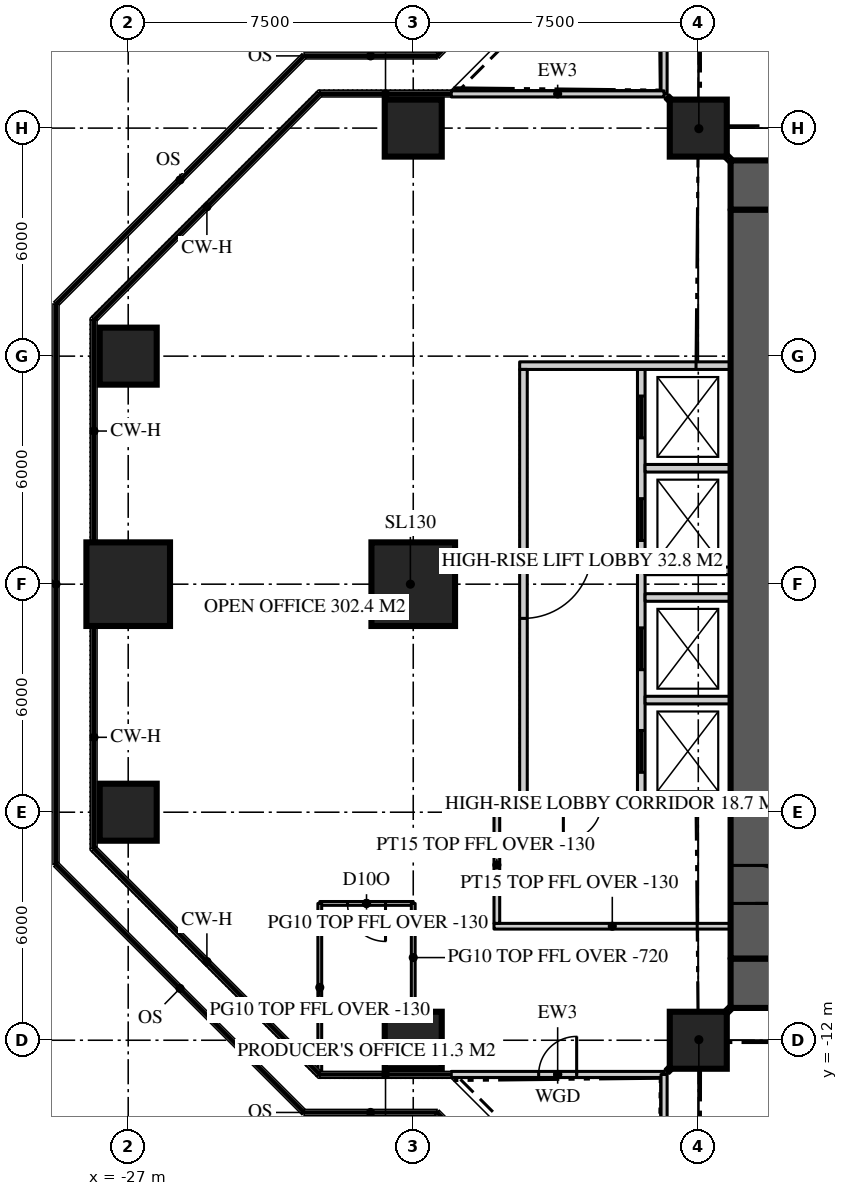
"""IFC4 building model, lengths in metres.
Left out: names, types, materials, properties, quantities, classifications, styles, units other than length and angle.
Written with IfcOpenShell. Run it as: python <this file> out.ifc"""

import sys

from ifc_helpers import new_model, si_unit, direction, frame, frame_2d, origin, origin_2d, place, context, subcontext, project, spatial, rectangle, extrude, element, fill, save


model = new_model("IFC4")
c1 = context("Model", 3, precision=1e-05, world=origin(), true_north=direction((0.0, 1.0)))
c2 = subcontext(c1, "Body", "Model", "MODEL_VIEW")
j1 = project(units=[si_unit("LENGTHUNIT", "METRE"), si_unit("PLANEANGLEUNIT", "RADIAN")], contexts=[c1])
p1 = place(None, origin())
s1 = spatial("IfcSite", under=j1, at=p1, CompositionType="ELEMENT")
p2 = place(p1, origin())
s2 = spatial("IfcBuilding", under=s1, at=p2, CompositionType="ELEMENT")
p3 = place(p2, frame((0.0, 0.0, 232.2)))
s3 = spatial("IfcBuildingStorey", under=s2, at=p3, CompositionType="ELEMENT", Elevation=232.2)
p4 = place(p3, frame((-11.15, 10.5, 0.0), z_axis=(0.0, 0.0, 1.0), x_axis=(1.0, 0.0, 0.0)))
e1 = element("IfcWall", 1, at=p4, inside=s3, PredefinedType="SHEAR", context=c2, shape_type="SweptSolid", body=[
    extrude(rectangle(XDim=22.3, YDim=1.3, at=frame_2d((11.15, 0.0))), origin(), (0.0, 0.0, 1.0), 3.9),
])
p5 = place(p4, frame((4.25, 0.0, 0.0)))
e2 = element("IfcOpeningElement", 2, at=p5, cuts=e1, PredefinedType="OPENING", context=c2, shape_type="SweptSolid", body=[
    extrude(rectangle(XDim=1.8, YDim=2.2, at=frame_2d((0.9, 1.1))), frame((0.0, 0.66, 0.0), z_axis=(0.0, -1.0, 0.0), x_axis=(1.0, 0.0, 0.0)), (0.0, 0.0, 1.0), 1.32),
])
p6 = place(p4, frame((16.25, 0.0, 0.0)))
e3 = element("IfcOpeningElement", 3, at=p6, cuts=e1, PredefinedType="OPENING", context=c2, shape_type="SweptSolid", body=[
    extrude(rectangle(XDim=1.8, YDim=2.2, at=frame_2d((0.9, 1.1))), frame((0.0, 0.66, 0.0), z_axis=(0.0, -1.0, 0.0), x_axis=(1.0, 0.0, 0.0)), (0.0, 0.0, 1.0), 1.32),
])
p7 = place(p3, frame((11.15, -10.5, 0.0), z_axis=(0.0, 0.0, 1.0), x_axis=(-1.0, 0.0, 0.0)))
e4 = element("IfcWall", 4, at=p7, inside=s3, PredefinedType="SHEAR", context=c2, shape_type="SweptSolid", body=[
    extrude(rectangle(XDim=22.3, YDim=1.3, at=frame_2d((11.15, 0.0))), origin(), (0.0, 0.0, 1.0), 3.9),
])
p8 = place(p7, frame((16.25, 0.0, 0.0)))
e5 = element("IfcOpeningElement", 5, at=p8, cuts=e4, PredefinedType="OPENING", context=c2, shape_type="SweptSolid", body=[
    extrude(rectangle(XDim=1.8, YDim=2.2, at=frame_2d((0.9, 1.1))), frame((0.0, 0.66, 0.0), z_axis=(0.0, -1.0, 0.0), x_axis=(1.0, 0.0, 0.0)), (0.0, 0.0, 1.0), 1.32),
])
p9 = place(p7, frame((4.25, 0.0, 0.0)))
e6 = element("IfcOpeningElement", 6, at=p9, cuts=e4, PredefinedType="OPENING", context=c2, shape_type="SweptSolid", body=[
    extrude(rectangle(XDim=1.8, YDim=2.2, at=frame_2d((0.9, 1.1))), frame((0.0, 0.66, 0.0), z_axis=(0.0, -1.0, 0.0), x_axis=(1.0, 0.0, 0.0)), (0.0, 0.0, 1.0), 1.32),
])
p10 = place(p3, frame((-10.5, 9.85, 0.0), z_axis=(0.0, 0.0, 1.0), x_axis=(0.0, -1.0, 0.0)))
e7 = element("IfcWall", 7, at=p10, inside=s3, PredefinedType="SHEAR", context=c2, shape_type="SweptSolid", body=[
    extrude(rectangle(XDim=19.7, YDim=1.3, at=frame_2d((9.85, 0.0))), origin(), (0.0, 0.0, 1.0), 3.9),
])
p11 = place(p10, frame((17.25, 0.0, 0.0)))
e8 = element("IfcOpeningElement", 8, at=p11, cuts=e7, PredefinedType="OPENING", context=c2, shape_type="SweptSolid", body=[
    extrude(rectangle(XDim=1.0, YDim=2.2, at=frame_2d((0.5, 1.1))), frame((0.0, 0.66, 0.0), z_axis=(0.0, -1.0, 0.0), x_axis=(1.0, 0.0, 0.0)), (0.0, 0.0, 1.0), 1.32),
])
for number, where, z_axis, x_axis in (
    (9, (-19.5, -12.0, 0.0), (0.0, 0.0, 1.0), (1.0, 0.0, 0.0)),
    (10, (-12.0, -12.0, 0.0), (0.0, 0.0, 1.0), (1.0, 0.0, 0.0)),
    (11, (-27.0, -6.0, 0.0), (0.0, 0.0, 1.0), (1.0, 0.0, 0.0)),
):
    element("IfcColumn", number, at=place(p3, frame(where, z_axis=z_axis, x_axis=x_axis)), inside=s3, PredefinedType="COLUMN", context=c2, shape_type="SweptSolid", body=[
        extrude(rectangle(XDim=1.5, YDim=1.5, at=origin_2d()), origin(), (0.0, 0.0, 1.0), 3.9),
    ])
for number, where, z_axis, x_axis in (
    (12, (-27.0, 0.0, 0.0), (0.0, 0.0, 1.0), (1.0, 0.0, 0.0)),
    (13, (-19.5, 0.0, 0.0), (0.0, 0.0, 1.0), (1.0, 0.0, 0.0)),
):
    element("IfcColumn", number, at=place(p3, frame(where, z_axis=z_axis, x_axis=x_axis)), inside=s3, PredefinedType="COLUMN", context=c2, shape_type="SweptSolid", body=[
        extrude(rectangle(XDim=2.2, YDim=2.2, at=origin_2d()), origin(), (0.0, 0.0, 1.0), 3.9),
    ])
for number, where, z_axis, x_axis in (
    (14, (-27.0, 6.0, 0.0), (0.0, 0.0, 1.0), (1.0, 0.0, 0.0)),
    (15, (-19.5, 12.0, 0.0), (0.0, 0.0, 1.0), (1.0, 0.0, 0.0)),
    (16, (-12.0, 12.0, 0.0), (0.0, 0.0, 1.0), (1.0, 0.0, 0.0)),
):
    element("IfcColumn", number, at=place(p3, frame(where, z_axis=z_axis, x_axis=x_axis)), inside=s3, PredefinedType="COLUMN", context=c2, shape_type="SweptSolid", body=[
        extrude(rectangle(XDim=1.5, YDim=1.5, at=origin_2d()), origin(), (0.0, 0.0, 1.0), 3.9),
    ])
p12 = place(p3, frame((-12.9, 18.5, 0.0), z_axis=(0.0, 0.0, 1.0), x_axis=(0.0, -1.0, 0.0)))
e17 = element("IfcWall", 17, at=p12, inside=s3, PredefinedType="SOLIDWALL", context=c2, shape_type="SweptSolid", body=[
    extrude(rectangle(XDim=5.6, YDim=0.16, at=frame_2d((2.8, 0.0))), origin(), (0.0, 0.0, 1.0), 3.77),
])
p13 = place(p12, frame((2.3, 0.0, 0.0)))
e18 = element("IfcOpeningElement", 18, at=p13, cuts=e17, PredefinedType="OPENING", context=c2, shape_type="SweptSolid", body=[
    extrude(rectangle(XDim=1.0, YDim=2.2, at=frame_2d((0.5, 1.1))), frame((0.0, 0.09, 0.0), z_axis=(0.0, -1.0, 0.0), x_axis=(1.0, 0.0, 0.0)), (0.0, 0.0, 1.0), 0.18),
])
p14 = place(p3, frame((-12.9, 12.9, 0.0), z_axis=(0.0, 0.0, 1.0), x_axis=(-1.0, 0.0, 0.0)))
e19 = element("IfcWall", 19, at=p14, inside=s3, PredefinedType="SOLIDWALL", context=c2, shape_type="SweptSolid", body=[
    extrude(rectangle(XDim=5.6, YDim=0.16, at=frame_2d((2.8, 0.0))), origin(), (0.0, 0.0, 1.0), 3.77),
])
p15 = place(p3, frame((-18.5, -12.9, 0.0), z_axis=(0.0, 0.0, 1.0), x_axis=(1.0, 0.0, 0.0)))
e20 = element("IfcWall", 20, at=p15, inside=s3, PredefinedType="SOLIDWALL", context=c2, shape_type="SweptSolid", body=[
    extrude(rectangle(XDim=5.6, YDim=0.16, at=frame_2d((2.8, 0.0))), origin(), (0.0, 0.0, 1.0), 3.77),
])
p16 = place(p15, frame((2.3, 0.0, 0.0)))
e21 = element("IfcOpeningElement", 21, at=p16, cuts=e20, PredefinedType="OPENING", context=c2, shape_type="SweptSolid", body=[
    extrude(rectangle(XDim=1.0, YDim=2.2, at=frame_2d((0.5, 1.1))), frame((0.0, 0.09, 0.0), z_axis=(0.0, -1.0, 0.0), x_axis=(1.0, 0.0, 0.0)), (0.0, 0.0, 1.0), 0.18),
])
p17 = place(p3, frame((-12.9, -12.9, 0.0), z_axis=(0.0, 0.0, 1.0), x_axis=(0.0, -1.0, 0.0)))
e22 = element("IfcWall", 22, at=p17, inside=s3, PredefinedType="SOLIDWALL", context=c2, shape_type="SweptSolid", body=[
    extrude(rectangle(XDim=5.6, YDim=0.16, at=frame_2d((2.8, 0.0))), origin(), (0.0, 0.0, 1.0), 3.77),
])
p18 = place(p3, frame((-19.5, -8.4, 0.0), z_axis=(0.0, 0.0, 1.0), x_axis=(-1.0, 0.0, 0.0)))
e23 = element("IfcWall", 23, at=p18, inside=s3, PredefinedType="PARTITIONING", context=c2, shape_type="SweptSolid", body=[
    extrude(rectangle(XDim=2.459, YDim=0.1, at=frame_2d((1.229, 0.0))), origin(), (0.0, 0.0, 1.0), 3.77),
])
p19 = place(p18, frame((0.729, 0.0, 0.0)))
e24 = element("IfcOpeningElement", 24, at=p19, cuts=e23, PredefinedType="OPENING", context=c2, shape_type="SweptSolid", body=[
    extrude(rectangle(XDim=1.0, YDim=2.2, at=frame_2d((0.5, 1.1))), frame((0.0, 0.06, 0.0), z_axis=(0.0, -1.0, 0.0), x_axis=(1.0, 0.0, 0.0)), (0.0, 0.0, 1.0), 0.12),
])
p20 = place(p3, frame((-19.5, -8.4, 0.0), z_axis=(0.0, 0.0, 1.0), x_axis=(0.0, -1.0, 0.0)))
e25 = element("IfcWall", 25, at=p20, inside=s3, PredefinedType="PARTITIONING", context=c2, shape_type="SweptSolid", body=[
    extrude(rectangle(XDim=2.85, YDim=0.1, at=frame_2d((1.425, 0.0))), origin(), (0.0, 0.0, 1.0), 3.18),
])
p21 = place(p3, frame((-21.959, -8.4, 0.0), z_axis=(0.0, 0.0, 1.0), x_axis=(0.0, -1.0, 0.0)))
e26 = element("IfcWall", 26, at=p21, inside=s3, PredefinedType="PARTITIONING", context=c2, shape_type="SweptSolid", body=[
    extrude(rectangle(XDim=4.42, YDim=0.1, at=frame_2d((2.21, 0.0))), origin(), (0.0, 0.0, 1.0), 3.77),
])
p22 = place(p3, frame((-13.5, 5.65, 0.0), z_axis=(0.0, 0.0, 1.0), x_axis=(0.0, -1.0, 0.0)))
e27 = element("IfcWall", 27, at=p22, inside=s3, PredefinedType="SOLIDWALL", context=c2, shape_type="SweptSolid", body=[
    extrude(rectangle(XDim=11.3, YDim=0.2, at=frame_2d((5.65, 0.0))), origin(), (0.0, 0.0, 1.0), 3.7),
])
p23 = place(p22, frame((0.7, 0.0, 0.0)))
e28 = element("IfcOpeningElement", 28, at=p23, cuts=e27, PredefinedType="OPENING", context=c2, shape_type="SweptSolid", body=[
    extrude(rectangle(XDim=1.1, YDim=2.2, at=frame_2d((0.55, 1.1))), frame((0.0, 0.11, 0.0), z_axis=(0.0, -1.0, 0.0), x_axis=(1.0, 0.0, 0.0)), (0.0, 0.0, 1.0), 0.22),
])
p24 = place(p22, frame((3.4, 0.0, 0.0)))
e29 = element("IfcOpeningElement", 29, at=p24, cuts=e27, PredefinedType="OPENING", context=c2, shape_type="SweptSolid", body=[
    extrude(rectangle(XDim=1.1, YDim=2.2, at=frame_2d((0.55, 1.1))), frame((0.0, 0.11, 0.0), z_axis=(0.0, -1.0, 0.0), x_axis=(1.0, 0.0, 0.0)), (0.0, 0.0, 1.0), 0.22),
])
p25 = place(p22, frame((6.8, 0.0, 0.0)))
e30 = element("IfcOpeningElement", 30, at=p25, cuts=e27, PredefinedType="OPENING", context=c2, shape_type="SweptSolid", body=[
    extrude(rectangle(XDim=1.1, YDim=2.2, at=frame_2d((0.55, 1.1))), frame((0.0, 0.11, 0.0), z_axis=(0.0, -1.0, 0.0), x_axis=(1.0, 0.0, 0.0)), (0.0, 0.0, 1.0), 0.22),
])
p26 = place(p22, frame((9.5, 0.0, 0.0)))
e31 = element("IfcOpeningElement", 31, at=p26, cuts=e27, PredefinedType="OPENING", context=c2, shape_type="SweptSolid", body=[
    extrude(rectangle(XDim=1.1, YDim=2.2, at=frame_2d((0.55, 1.1))), frame((0.0, 0.11, 0.0), z_axis=(0.0, -1.0, 0.0), x_axis=(1.0, 0.0, 0.0)), (0.0, 0.0, 1.0), 0.22),
])
p27 = place(p3, frame((-11.15, 5.75, 0.0), z_axis=(0.0, 0.0, 1.0), x_axis=(-1.0, 0.0, 0.0)))
e32 = element("IfcWall", 32, at=p27, inside=s3, PredefinedType="SOLIDWALL", context=c2, shape_type="SweptSolid", body=[
    extrude(rectangle(XDim=5.55, YDim=0.2, at=frame_2d((2.775, 0.0))), origin(), (0.0, 0.0, 1.0), 3.7),
])
p28 = place(p3, frame((-11.15, -5.75, 0.0), z_axis=(0.0, 0.0, 1.0), x_axis=(-1.0, 0.0, 0.0)))
e33 = element("IfcWall", 33, at=p28, inside=s3, PredefinedType="SOLIDWALL", context=c2, shape_type="SweptSolid", body=[
    extrude(rectangle(XDim=5.55, YDim=0.2, at=frame_2d((2.775, 0.0))), origin(), (0.0, 0.0, 1.0), 3.7),
])
p29 = place(p28, frame((3.4, 0.0, 0.0)))
e34 = element("IfcOpeningElement", 34, at=p29, cuts=e33, PredefinedType="OPENING", context=c2, shape_type="SweptSolid", body=[
    extrude(rectangle(XDim=1.0, YDim=2.2, at=frame_2d((0.5, 1.1))), frame((0.0, 0.11, 0.0), z_axis=(0.0, -1.0, 0.0), x_axis=(1.0, 0.0, 0.0)), (0.0, 0.0, 1.0), 0.22),
])
for number, where, z_axis, x_axis in (
    (35, (-11.15, 3.05, 0.0), (0.0, 0.0, 1.0), (-1.0, 0.0, 0.0)),
    (36, (-11.15, 0.35, 0.0), (0.0, 0.0, 1.0), (-1.0, 0.0, 0.0)),
    (37, (-11.15, -0.35, 0.0), (0.0, 0.0, 1.0), (-1.0, 0.0, 0.0)),
    (38, (-11.15, -3.05, 0.0), (0.0, 0.0, 1.0), (-1.0, 0.0, 0.0)),
):
    element("IfcWall", number, at=place(p3, frame(where, z_axis=z_axis, x_axis=x_axis)), inside=s3, PredefinedType="SOLIDWALL", context=c2, shape_type="SweptSolid", body=[
        extrude(rectangle(XDim=2.25, YDim=0.2, at=frame_2d((1.125, 0.0))), origin(), (0.0, 0.0, 1.0), 3.7),
    ])
p30 = place(p3, frame((-16.6, 5.65, 0.0), z_axis=(0.0, 0.0, 1.0), x_axis=(0.0, -1.0, 0.0)))
e39 = element("IfcWall", 39, at=p30, inside=s3, PredefinedType="SOLIDWALL", context=c2, shape_type="SweptSolid", body=[
    extrude(rectangle(XDim=11.3, YDim=0.2, at=frame_2d((5.65, 0.0))), origin(), (0.0, 0.0, 1.0), 3.18),
])
p31 = place(p30, frame((4.75, 0.0, 0.0)))
e40 = element("IfcOpeningElement", 40, at=p31, cuts=e39, PredefinedType="OPENING", context=c2, shape_type="SweptSolid", body=[
    extrude(rectangle(XDim=1.8, YDim=2.2, at=frame_2d((0.9, 1.1))), frame((0.0, 0.11, 0.0), z_axis=(0.0, -1.0, 0.0), x_axis=(1.0, 0.0, 0.0)), (0.0, 0.0, 1.0), 0.22),
])
for number, where, z_axis, x_axis in (
    (41, (-11.15, 11.15, 0.0), (0.0, 0.0, 1.0), (-0.707, 0.707, 0.0)),
    (42, (-11.15, -11.15, 0.0), (0.0, 0.0, 1.0), (-0.707, -0.707, 0.0)),
):
    element("IfcWall", number, at=place(p3, frame(where, z_axis=z_axis, x_axis=x_axis)), inside=s3, PredefinedType="PARTITIONING", context=c2, shape_type="SweptSolid", body=[
        extrude(rectangle(XDim=2.362, YDim=0.15, at=frame_2d((1.181, 0.0))), origin(), (0.0, 0.0, 1.0), 3.22),
    ])
p32 = place(p3, frame((-11.15, -9.0, 0.0), z_axis=(0.0, 0.0, 1.0), x_axis=(-1.0, 0.0, 0.0)))
e43 = element("IfcWall", 43, at=p32, inside=s3, PredefinedType="PARTITIONING", context=c2, shape_type="SweptSolid", body=[
    extrude(rectangle(XDim=6.225, YDim=0.15, at=frame_2d((3.113, 0.0))), origin(), (0.0, 0.0, 1.0), 3.77),
])
p33 = place(p3, frame((-17.3, -5.85, 0.0), z_axis=(0.0, 0.0, 1.0), x_axis=(0.0, -1.0, 0.0)))
e44 = element("IfcWall", 44, at=p33, inside=s3, PredefinedType="PARTITIONING", context=c2, shape_type="SweptSolid", body=[
    extrude(rectangle(XDim=3.075, YDim=0.15, at=frame_2d((1.538, 0.0))), origin(), (0.0, 0.0, 1.0), 3.77),
])
p34 = place(p16, origin())
e45 = element("IfcDoor", 45, at=p34, inside=s3, OperationType="SINGLE_SWING_RIGHT", PredefinedType="DOOR", context=c2, shape_type="SweptSolid", body=[
    extrude(rectangle(XDim=1.0, YDim=2.2, at=frame_2d((0.5, 1.1))), frame((0.0, 0.025, 0.0), z_axis=(0.0, -1.0, 0.0), x_axis=(1.0, 0.0, 0.0)), (0.0, 0.0, 1.0), 0.05),
])
fill(e21, e45)
p35 = place(p11, origin())
e46 = element("IfcDoor", 46, at=p35, inside=s3, OperationType="SINGLE_SWING_RIGHT", PredefinedType="DOOR", context=c2, shape_type="SweptSolid", body=[
    extrude(rectangle(XDim=1.0, YDim=2.2, at=frame_2d((0.5, 1.1))), frame((0.0, 0.025, 0.0), z_axis=(0.0, -1.0, 0.0), x_axis=(1.0, 0.0, 0.0)), (0.0, 0.0, 1.0), 0.05),
])
fill(e8, e46)
p36 = place(p19, origin())
e47 = element("IfcDoor", 47, at=p36, inside=s3, OperationType="SINGLE_SWING_LEFT", PredefinedType="DOOR", context=c2, shape_type="SweptSolid", body=[
    extrude(rectangle(XDim=1.0, YDim=2.2, at=frame_2d((0.5, 1.1))), frame((0.0, 0.025, 0.0), z_axis=(0.0, -1.0, 0.0), x_axis=(1.0, 0.0, 0.0)), (0.0, 0.0, 1.0), 0.05),
])
fill(e24, e47)
p37 = place(p31, origin())
e48 = element("IfcDoor", 48, at=p37, inside=s3, OperationType="DOUBLE_DOOR_DOUBLE_SWING", PredefinedType="DOOR", context=c2, shape_type="SweptSolid", body=[
    extrude(rectangle(XDim=1.8, YDim=2.2, at=frame_2d((0.9, 1.1))), frame((0.0, 0.025, 0.0), z_axis=(0.0, -1.0, 0.0), x_axis=(1.0, 0.0, 0.0)), (0.0, 0.0, 1.0), 0.05),
])
fill(e40, e48)
p38 = place(p23, origin())
e49 = element("IfcDoor", 49, at=p38, inside=s3, OperationType="SLIDING_TO_LEFT", PredefinedType="DOOR", context=c2, shape_type="SweptSolid", body=[
    extrude(rectangle(XDim=1.1, YDim=2.2, at=frame_2d((0.55, 1.1))), frame((0.0, 0.025, 0.0), z_axis=(0.0, -1.0, 0.0), x_axis=(1.0, 0.0, 0.0)), (0.0, 0.0, 1.0), 0.05),
])
fill(e28, e49)
p39 = place(p24, origin())
e50 = element("IfcDoor", 50, at=p39, inside=s3, OperationType="SLIDING_TO_LEFT", PredefinedType="DOOR", context=c2, shape_type="SweptSolid", body=[
    extrude(rectangle(XDim=1.1, YDim=2.2, at=frame_2d((0.55, 1.1))), frame((0.0, 0.025, 0.0), z_axis=(0.0, -1.0, 0.0), x_axis=(1.0, 0.0, 0.0)), (0.0, 0.0, 1.0), 0.05),
])
fill(e29, e50)
p40 = place(p25, origin())
e51 = element("IfcDoor", 51, at=p40, inside=s3, OperationType="SLIDING_TO_LEFT", PredefinedType="DOOR", context=c2, shape_type="SweptSolid", body=[
    extrude(rectangle(XDim=1.1, YDim=2.2, at=frame_2d((0.55, 1.1))), frame((0.0, 0.025, 0.0), z_axis=(0.0, -1.0, 0.0), x_axis=(1.0, 0.0, 0.0)), (0.0, 0.0, 1.0), 0.05),
])
fill(e30, e51)
p41 = place(p26, origin())
e52 = element("IfcDoor", 52, at=p41, inside=s3, OperationType="SLIDING_TO_LEFT", PredefinedType="DOOR", context=c2, shape_type="SweptSolid", body=[
    extrude(rectangle(XDim=1.1, YDim=2.2, at=frame_2d((0.55, 1.1))), frame((0.0, 0.025, 0.0), z_axis=(0.0, -1.0, 0.0), x_axis=(1.0, 0.0, 0.0)), (0.0, 0.0, 1.0), 0.05),
])
fill(e31, e52)
p42 = place(p29, origin())
e53 = element("IfcDoor", 53, at=p42, inside=s3, OperationType="SINGLE_SWING_RIGHT", PredefinedType="DOOR", context=c2, shape_type="SweptSolid", body=[
    extrude(rectangle(XDim=1.0, YDim=2.2, at=frame_2d((0.5, 1.1))), frame((0.0, 0.025, 0.0), z_axis=(0.0, -1.0, 0.0), x_axis=(1.0, 0.0, 0.0)), (0.0, 0.0, 1.0), 0.05),
])
fill(e34, e53)
save(model, sys.argv[1])
